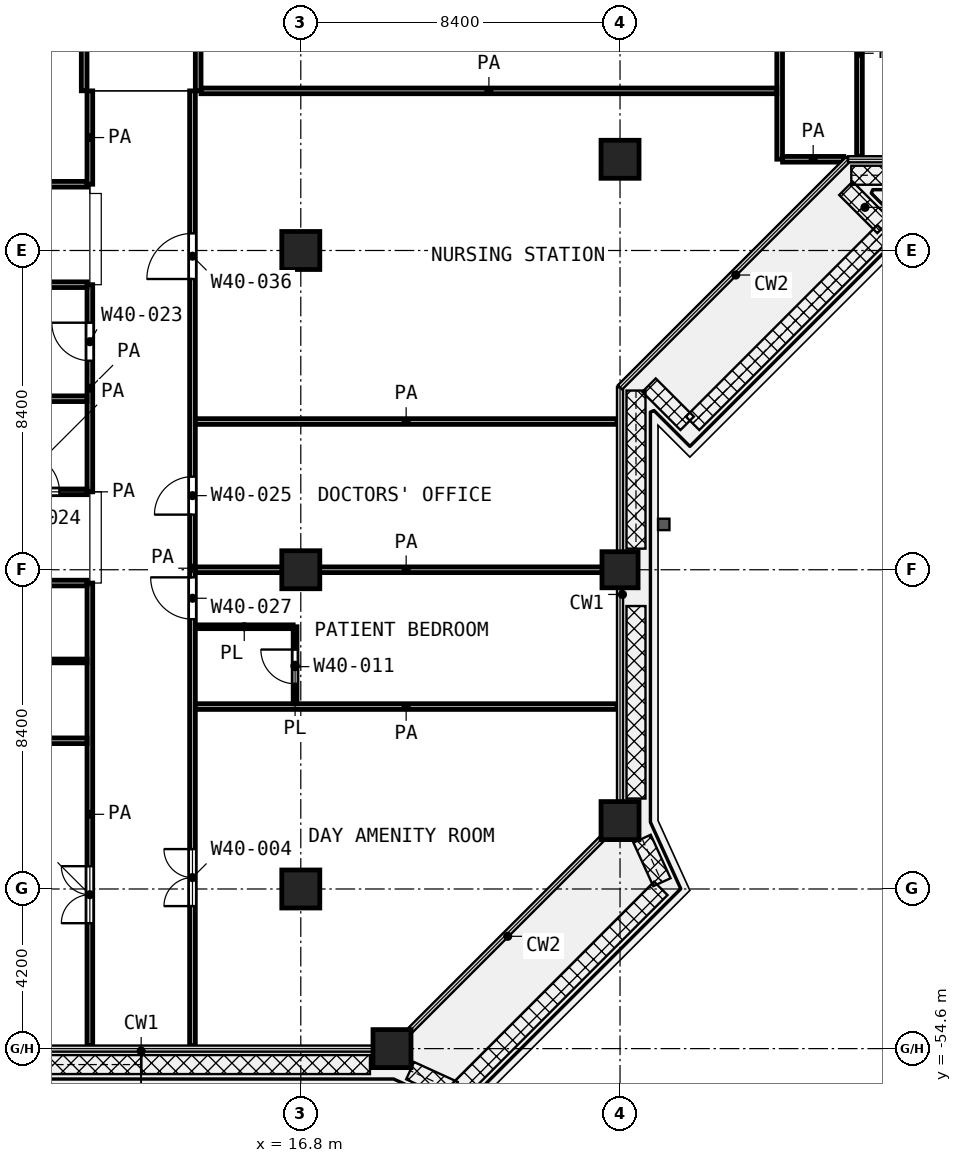
"""IFC4 building model, lengths in metres.
Left out: names, types, materials, properties, quantities, classifications, styles, units other than length and angle.
Written with IfcOpenShell. Run it as: python <this file> out.ifc"""

import sys

from ifc_helpers import new_model, si_unit, direction, frame, frame_2d, origin, origin_2d, place, context, subcontext, project, spatial, rectangle, extrude, element, fill, save


model = new_model("IFC4")
c1 = context("Model", 3, precision=1e-05, world=origin(), true_north=direction((0.0, 1.0)))
c2 = subcontext(c1, "Body", "Model", "MODEL_VIEW")
j1 = project(units=[si_unit("LENGTHUNIT", "METRE"), si_unit("PLANEANGLEUNIT", "RADIAN")], contexts=[c1])
p1 = place(None, origin())
s1 = spatial("IfcSite", under=j1, at=p1, CompositionType="ELEMENT")
p2 = place(p1, origin())
s2 = spatial("IfcBuilding", under=s1, at=p2, CompositionType="ELEMENT")
p3 = place(p2, frame((0.0, 0.0, 196.2)))
s3 = spatial("IfcBuildingStorey", under=s2, at=p3, CompositionType="ELEMENT", Elevation=196.2)
for number, where, z_axis, x_axis in (
    (1, (25.2, -31.2, 0.0), (0.0, 0.0, 1.0), (1.0, 0.0, 0.0)),
    (2, (16.8, -33.6, 0.0), (0.0, 0.0, 1.0), (1.0, 0.0, 0.0)),
    (3, (16.8, -42.0, 0.0), (0.0, 0.0, 1.0), (1.0, 0.0, 0.0)),
):
    element("IfcColumn", number, at=place(p3, frame(where, z_axis=z_axis, x_axis=x_axis)), inside=s3, PredefinedType="COLUMN", context=c2, shape_type="SweptSolid", body=[
        extrude(rectangle(XDim=1.0, YDim=1.0, at=origin_2d()), origin(), (0.0, 0.0, 1.0), 4.2),
    ])
p4 = place(p3, frame((25.2, -42.0, 0.0), z_axis=(0.0, 0.0, 1.0), x_axis=(1.0, 0.0, 0.0)))
e4 = element("IfcColumn", 4, at=p4, inside=s3, PredefinedType="COLUMN", context=c2, shape_type="SweptSolid", body=[
    extrude(rectangle(XDim=0.95, YDim=0.95, at=origin_2d()), origin(), (0.0, 0.0, 1.0), 4.2),
])
for number, where, z_axis, x_axis in (
    (5, (25.2, -48.6, 0.0), (0.0, 0.0, 1.0), (1.0, 0.0, 0.0)),
    (6, (16.8, -50.4, 0.0), (0.0, 0.0, 1.0), (1.0, 0.0, 0.0)),
    (7, (19.2, -54.6, 0.0), (0.0, 0.0, 1.0), (1.0, 0.0, 0.0)),
):
    element("IfcColumn", number, at=place(p3, frame(where, z_axis=z_axis, x_axis=x_axis)), inside=s3, PredefinedType="COLUMN", context=c2, shape_type="SweptSolid", body=[
        extrude(rectangle(XDim=1.0, YDim=1.0, at=origin_2d()), origin(), (0.0, 0.0, 1.0), 4.2),
    ])
p5 = place(p3, frame((8.6, -44.4, 0.0), z_axis=(0.0, 0.0, 1.0), x_axis=(1.0, 0.0, 0.0)))
e8 = element("IfcWall", 8, at=p5, inside=s3, PredefinedType="PARTITIONING", context=c2, shape_type="SweptSolid", body=[
    extrude(rectangle(XDim=2.575, YDim=0.1, at=frame_2d((1.288, 0.0))), origin(), (0.0, 0.0, 1.0), 3.6),
])
p6 = place(p3, frame((14.025, -43.5, 0.0), z_axis=(0.0, 0.0, 1.0), x_axis=(1.0, 0.0, 0.0)))
e9 = element("IfcWall", 9, at=p6, inside=s3, PredefinedType="PARTITIONING", context=c2, shape_type="SweptSolid", body=[
    extrude(rectangle(XDim=2.575, YDim=0.1, at=frame_2d((1.288, 0.0))), origin(), (0.0, 0.0, 1.0), 3.6),
])
p7 = place(p3, frame((16.65, -45.525, 0.0), z_axis=(0.0, 0.0, 1.0), x_axis=(0.0, 1.0, 0.0)))
e10 = element("IfcWall", 10, at=p7, inside=s3, PredefinedType="PARTITIONING", context=c2, shape_type="SweptSolid", body=[
    extrude(rectangle(XDim=2.025, YDim=0.1, at=frame_2d((1.012, 0.0))), origin(), (0.0, 0.0, 1.0), 3.6),
])
p8 = place(p7, frame((0.525, 0.0, 0.0)))
e11 = element("IfcOpeningElement", 11, at=p8, cuts=e10, PredefinedType="OPENING", context=c2, shape_type="SweptSolid", body=[
    extrude(rectangle(XDim=0.9, YDim=2.1, at=frame_2d((0.45, 1.05))), frame((0.0, 0.06, 0.0), z_axis=(0.0, -1.0, 0.0), x_axis=(1.0, 0.0, 0.0)), (0.0, 0.0, 1.0), 0.12),
])
p9 = place(p3, frame((0.08, -46.5, 0.0), z_axis=(0.0, 0.0, 1.0), x_axis=(1.0, 0.0, 0.0)))
e12 = element("IfcWall", 12, at=p9, inside=s3, PredefinedType="PARTITIONING", context=c2, shape_type="SweptSolid", body=[
    extrude(rectangle(XDim=11.095, YDim=0.15, at=frame_2d((5.547, 0.0))), origin(), (0.0, 0.0, 1.0), 3.6),
])
p10 = place(p3, frame((14.025, -45.6, 0.0), z_axis=(0.0, 0.0, 1.0), x_axis=(1.0, 0.0, 0.0)))
e13 = element("IfcWall", 13, at=p10, inside=s3, PredefinedType="PARTITIONING", context=c2, shape_type="SweptSolid", body=[
    extrude(rectangle(XDim=11.095, YDim=0.15, at=frame_2d((5.548, 0.0))), origin(), (0.0, 0.0, 1.0), 3.6),
])
p11 = place(p3, frame((2.327, -42.35, 0.0), z_axis=(0.0, 0.0, 1.0), x_axis=(1.0, 0.0, 0.0)))
e14 = element("IfcWall", 14, at=p11, inside=s3, PredefinedType="PARTITIONING", context=c2, shape_type="SweptSolid", body=[
    extrude(rectangle(XDim=8.848, YDim=0.15, at=frame_2d((4.424, 0.0))), origin(), (0.0, 0.0, 1.0), 3.6),
])
p12 = place(p11, frame((4.324, 0.0, 0.0)))
e15 = element("IfcOpeningElement", 15, at=p12, cuts=e14, PredefinedType="OPENING", context=c2, shape_type="SweptSolid", body=[
    extrude(rectangle(XDim=1.2, YDim=2.1, at=frame_2d((0.6, 1.05))), frame((0.0, 0.085, 0.0), z_axis=(0.0, -1.0, 0.0), x_axis=(1.0, 0.0, 0.0)), (0.0, 0.0, 1.0), 0.17),
])
p13 = place(p11, frame((2.324, 0.0, 0.0)))
e16 = element("IfcOpeningElement", 16, at=p13, cuts=e14, PredefinedType="OPENING", context=c2, shape_type="SweptSolid", body=[
    extrude(rectangle(XDim=1.2, YDim=2.1, at=frame_2d((0.6, 1.05))), frame((0.0, 0.085, 0.0), z_axis=(0.0, -1.0, 0.0), x_axis=(1.0, 0.0, 0.0)), (0.0, 0.0, 1.0), 0.17),
])
p14 = place(p3, frame((14.025, -42.0, 0.0), z_axis=(0.0, 0.0, 1.0), x_axis=(1.0, 0.0, 0.0)))
e17 = element("IfcWall", 17, at=p14, inside=s3, PredefinedType="PARTITIONING", context=c2, shape_type="SweptSolid", body=[
    extrude(rectangle(XDim=11.095, YDim=0.15, at=frame_2d((5.548, 0.0))), origin(), (0.0, 0.0, 1.0), 3.6),
])
p15 = place(p3, frame((8.65, -39.95, 0.0), z_axis=(0.0, 0.0, 1.0), x_axis=(1.0, 0.0, 0.0)))
e18 = element("IfcWall", 18, at=p15, inside=s3, PredefinedType="PARTITIONING", context=c2, shape_type="SweptSolid", body=[
    extrude(rectangle(XDim=2.525, YDim=0.15, at=frame_2d((1.263, 0.0))), origin(), (0.0, 0.0, 1.0), 3.6),
])
p16 = place(p15, frame((0.8, 0.0, 0.0)))
e19 = element("IfcOpeningElement", 19, at=p16, cuts=e18, PredefinedType="OPENING", context=c2, shape_type="SweptSolid", body=[
    extrude(rectangle(XDim=1.0, YDim=2.1, at=frame_2d((0.5, 1.05))), frame((0.0, 0.085, 0.0), z_axis=(0.0, -1.0, 0.0), x_axis=(1.0, 0.0, 0.0)), (0.0, 0.0, 1.0), 0.17),
])
p17 = place(p3, frame((14.025, -38.1, 0.0), z_axis=(0.0, 0.0, 1.0), x_axis=(1.0, 0.0, 0.0)))
e20 = element("IfcWall", 20, at=p17, inside=s3, PredefinedType="PARTITIONING", context=c2, shape_type="SweptSolid", body=[
    extrude(rectangle(XDim=11.095, YDim=0.15, at=frame_2d((5.548, 0.0))), origin(), (0.0, 0.0, 1.0), 3.6),
])
p18 = place(p3, frame((8.65, -37.5, 0.0), z_axis=(0.0, 0.0, 1.0), x_axis=(1.0, 0.0, 0.0)))
e21 = element("IfcWall", 21, at=p18, inside=s3, PredefinedType="PARTITIONING", context=c2, shape_type="SweptSolid", body=[
    extrude(rectangle(XDim=2.525, YDim=0.15, at=frame_2d((1.263, 0.0))), origin(), (0.0, 0.0, 1.0), 3.6),
])
p19 = place(p3, frame((8.975, -34.5, 0.0), z_axis=(0.0, 0.0, 1.0), x_axis=(1.0, 0.0, 0.0)))
e22 = element("IfcWall", 22, at=p19, inside=s3, PredefinedType="PARTITIONING", context=c2, shape_type="SweptSolid", body=[
    extrude(rectangle(XDim=2.2, YDim=0.15, at=frame_2d((1.1, 0.0))), origin(), (0.0, 0.0, 1.0), 3.6),
])
p20 = place(p3, frame((0.08, -31.857, 0.0), z_axis=(0.0, 0.0, 1.0), x_axis=(1.0, 0.0, 0.0)))
e23 = element("IfcWall", 23, at=p20, inside=s3, PredefinedType="PARTITIONING", context=c2, shape_type="SweptSolid", body=[
    extrude(rectangle(XDim=11.095, YDim=0.15, at=frame_2d((5.547, 0.0))), origin(), (0.0, 0.0, 1.0), 3.6),
])
p21 = place(p20, frame((4.945, 0.0, 0.0)))
e24 = element("IfcOpeningElement", 24, at=p21, cuts=e23, PredefinedType="OPENING", context=c2, shape_type="SweptSolid", body=[
    extrude(rectangle(XDim=1.2, YDim=2.1, at=frame_2d((0.6, 1.05))), frame((0.0, 0.085, 0.0), z_axis=(0.0, -1.0, 0.0), x_axis=(1.0, 0.0, 0.0)), (0.0, 0.0, 1.0), 0.17),
])
p22 = place(p3, frame((29.477, -31.2, 0.0), z_axis=(0.0, 0.0, 1.0), x_axis=(1.0, 0.0, 0.0)))
e25 = element("IfcWall", 25, at=p22, inside=s3, PredefinedType="PARTITIONING", context=c2, shape_type="SweptSolid", body=[
    extrude(rectangle(XDim=1.61, YDim=0.15, at=frame_2d((0.805, 0.0))), origin(), (0.0, 0.0, 1.0), 3.6),
])
p23 = place(p3, frame((14.175, -29.4, 0.0), z_axis=(0.0, 0.0, 1.0), x_axis=(1.0, 0.0, 0.0)))
e26 = element("IfcWall", 26, at=p23, inside=s3, PredefinedType="PARTITIONING", context=c2, shape_type="SweptSolid", body=[
    extrude(rectangle(XDim=15.15, YDim=0.15, at=frame_2d((7.575, 0.0))), origin(), (0.0, 0.0, 1.0), 3.6),
])
p24 = place(p3, frame((11.1, -29.398, 0.0), z_axis=(0.0, 0.0, 1.0), x_axis=(0.0, 1.0, 0.0)))
e27 = element("IfcWall", 27, at=p24, inside=s3, PredefinedType="PARTITIONING", context=c2, shape_type="SweptSolid", body=[
    extrude(rectangle(XDim=4.498, YDim=0.15, at=frame_2d((2.249, 0.0))), origin(), (0.0, 0.0, 1.0), 3.6),
])
p25 = place(p3, frame((11.25, -54.52, 0.0), z_axis=(0.0, 0.0, 1.0), x_axis=(0.0, 1.0, 0.0)))
e28 = element("IfcWall", 28, at=p25, inside=s3, PredefinedType="PARTITIONING", context=c2, shape_type="SweptSolid", body=[
    extrude(rectangle(XDim=12.17, YDim=0.15, at=frame_2d((6.085, 0.0))), origin(), (0.0, 0.0, 1.0), 3.6),
])
p26 = place(p25, frame((3.22, 0.0, 0.0)))
e29 = element("IfcOpeningElement", 29, at=p26, cuts=e28, PredefinedType="OPENING", context=c2, shape_type="SweptSolid", body=[
    extrude(rectangle(XDim=1.5, YDim=2.1, at=frame_2d((0.75, 1.05))), frame((0.0, 0.085, 0.0), z_axis=(0.0, -1.0, 0.0), x_axis=(1.0, 0.0, 0.0)), (0.0, 0.0, 1.0), 0.17),
])
p27 = place(p3, frame((11.25, -39.95, 0.0), z_axis=(0.0, 0.0, 1.0), x_axis=(0.0, 1.0, 0.0)))
e30 = element("IfcWall", 30, at=p27, inside=s3, PredefinedType="PARTITIONING", context=c2, shape_type="SweptSolid", body=[
    extrude(rectangle(XDim=5.45, YDim=0.15, at=frame_2d((2.725, 0.0))), origin(), (0.0, 0.0, 1.0), 3.6),
])
p28 = place(p27, frame((3.45, 0.0, 0.0)))
e31 = element("IfcOpeningElement", 31, at=p28, cuts=e30, PredefinedType="OPENING", context=c2, shape_type="SweptSolid", body=[
    extrude(rectangle(XDim=1.0, YDim=2.1, at=frame_2d((0.5, 1.05))), frame((0.0, 0.085, 0.0), z_axis=(0.0, -1.0, 0.0), x_axis=(1.0, 0.0, 0.0)), (0.0, 0.0, 1.0), 0.17),
])
p29 = place(p3, frame((11.25, -31.857, 0.0), z_axis=(0.0, 0.0, 1.0), x_axis=(0.0, 1.0, 0.0)))
e32 = element("IfcWall", 32, at=p29, inside=s3, PredefinedType="PARTITIONING", context=c2, shape_type="SweptSolid", body=[
    extrude(rectangle(XDim=2.457, YDim=0.15, at=frame_2d((1.229, 0.0))), origin(), (0.0, 0.0, 1.0), 3.6),
])
p30 = place(p3, frame((13.95, -54.52, 0.0), z_axis=(0.0, 0.0, 1.0), x_axis=(0.0, 1.0, 0.0)))
e33 = element("IfcWall", 33, at=p30, inside=s3, PredefinedType="PARTITIONING", context=c2, shape_type="SweptSolid", body=[
    extrude(rectangle(XDim=25.12, YDim=0.15, at=frame_2d((12.56, 0.0))), origin(), (0.0, 0.0, 1.0), 3.6),
])
p31 = place(p30, frame((20.17, 0.0, 0.0)))
e34 = element("IfcOpeningElement", 34, at=p31, cuts=e33, PredefinedType="OPENING", context=c2, shape_type="SweptSolid", body=[
    extrude(rectangle(XDim=1.2, YDim=2.1, at=frame_2d((0.6, 1.05))), frame((0.0, 0.085, 0.0), z_axis=(0.0, -1.0, 0.0), x_axis=(1.0, 0.0, 0.0)), (0.0, 0.0, 1.0), 0.17),
])
p32 = place(p30, frame((13.97, 0.0, 0.0)))
e35 = element("IfcOpeningElement", 35, at=p32, cuts=e33, PredefinedType="OPENING", context=c2, shape_type="SweptSolid", body=[
    extrude(rectangle(XDim=1.0, YDim=2.1, at=frame_2d((0.5, 1.05))), frame((0.0, 0.085, 0.0), z_axis=(0.0, -1.0, 0.0), x_axis=(1.0, 0.0, 0.0)), (0.0, 0.0, 1.0), 0.17),
])
p33 = place(p30, frame((11.22, 0.0, 0.0)))
e36 = element("IfcOpeningElement", 36, at=p33, cuts=e33, PredefinedType="OPENING", context=c2, shape_type="SweptSolid", body=[
    extrude(rectangle(XDim=1.1, YDim=2.1, at=frame_2d((0.55, 1.05))), frame((0.0, 0.085, 0.0), z_axis=(0.0, -1.0, 0.0), x_axis=(1.0, 0.0, 0.0)), (0.0, 0.0, 1.0), 0.17),
])
p34 = place(p30, frame((3.67, 0.0, 0.0)))
e37 = element("IfcOpeningElement", 37, at=p34, cuts=e33, PredefinedType="OPENING", context=c2, shape_type="SweptSolid", body=[
    extrude(rectangle(XDim=1.5, YDim=2.1, at=frame_2d((0.75, 1.05))), frame((0.0, 0.085, 0.0), z_axis=(0.0, -1.0, 0.0), x_axis=(1.0, 0.0, 0.0)), (0.0, 0.0, 1.0), 0.17),
])
p35 = place(p3, frame((14.1, -29.4, 0.0), z_axis=(0.0, 0.0, 1.0), x_axis=(0.0, 1.0, 0.0)))
e38 = element("IfcWall", 38, at=p35, inside=s3, PredefinedType="PARTITIONING", context=c2, shape_type="SweptSolid", body=[
    extrude(rectangle(XDim=4.5, YDim=0.15, at=frame_2d((2.25, 0.0))), origin(), (0.0, 0.0, 1.0), 3.6),
])
p36 = place(p3, frame((29.4, -31.198, 0.0), z_axis=(0.0, 0.0, 1.0), x_axis=(0.0, 1.0, 0.0)))
e39 = element("IfcWall", 39, at=p36, inside=s3, PredefinedType="PARTITIONING", context=c2, shape_type="SweptSolid", body=[
    extrude(rectangle(XDim=17.098, YDim=0.15, at=frame_2d((8.549, 0.0))), origin(), (0.0, 0.0, 1.0), 3.6),
])
p37 = place(p3, frame((31.5, -31.12, 0.0), z_axis=(0.0, 0.0, 1.0), x_axis=(0.0, 1.0, 0.0)))
e40 = element("IfcWall", 40, at=p37, inside=s3, PredefinedType="PARTITIONING", context=c2, shape_type="SweptSolid", body=[
    extrude(rectangle(XDim=5.418, YDim=0.15, at=frame_2d((2.709, 0.0))), origin(), (0.0, 0.0, 1.0), 3.6),
])
p38 = place(p28, origin())
e41 = element("IfcDoor", 41, at=p38, inside=s3, OperationType="SINGLE_SWING_RIGHT", PredefinedType="DOOR", context=c2, shape_type="SweptSolid", body=[
    extrude(rectangle(XDim=1.0, YDim=2.1, at=frame_2d((0.5, 1.05))), frame((0.0, 0.025, 0.0), z_axis=(0.0, -1.0, 0.0), x_axis=(1.0, 0.0, 0.0)), (0.0, 0.0, 1.0), 0.05),
])
fill(e31, e41)
p39 = place(p16, origin())
e42 = element("IfcDoor", 42, at=p39, inside=s3, OperationType="SINGLE_SWING_LEFT", PredefinedType="DOOR", context=c2, shape_type="SweptSolid", body=[
    extrude(rectangle(XDim=1.0, YDim=2.1, at=frame_2d((0.5, 1.05))), frame((0.0, 0.025, 0.0), z_axis=(0.0, -1.0, 0.0), x_axis=(1.0, 0.0, 0.0)), (0.0, 0.0, 1.0), 0.05),
])
fill(e19, e42)
p40 = place(p26, origin())
e43 = element("IfcDoor", 43, at=p40, inside=s3, OperationType="DOUBLE_DOOR_SINGLE_SWING", PredefinedType="DOOR", context=c2, shape_type="SweptSolid", body=[
    extrude(rectangle(XDim=1.5, YDim=2.1, at=frame_2d((0.75, 1.05))), frame((0.0, 0.025, 0.0), z_axis=(0.0, -1.0, 0.0), x_axis=(1.0, 0.0, 0.0)), (0.0, 0.0, 1.0), 0.05),
])
fill(e29, e43)
p41 = place(p31, origin())
e44 = element("IfcDoor", 44, at=p41, inside=s3, OperationType="SINGLE_SWING_LEFT", PredefinedType="DOOR", context=c2, shape_type="SweptSolid", body=[
    extrude(rectangle(XDim=1.2, YDim=2.1, at=frame_2d((0.6, 1.05))), frame((0.0, 0.025, 0.0), z_axis=(0.0, -1.0, 0.0), x_axis=(1.0, 0.0, 0.0)), (0.0, 0.0, 1.0), 0.05),
])
fill(e34, e44)
p42 = place(p32, origin())
e45 = element("IfcDoor", 45, at=p42, inside=s3, OperationType="SINGLE_SWING_LEFT", PredefinedType="DOOR", context=c2, shape_type="SweptSolid", body=[
    extrude(rectangle(XDim=1.0, YDim=2.1, at=frame_2d((0.5, 1.05))), frame((0.0, 0.025, 0.0), z_axis=(0.0, -1.0, 0.0), x_axis=(1.0, 0.0, 0.0)), (0.0, 0.0, 1.0), 0.05),
])
fill(e35, e45)
p43 = place(p33, origin())
e46 = element("IfcDoor", 46, at=p43, inside=s3, OperationType="SINGLE_SWING_RIGHT", PredefinedType="DOOR", context=c2, shape_type="SweptSolid", body=[
    extrude(rectangle(XDim=1.1, YDim=2.1, at=frame_2d((0.55, 1.05))), frame((0.0, 0.025, 0.0), z_axis=(0.0, -1.0, 0.0), x_axis=(1.0, 0.0, 0.0)), (0.0, 0.0, 1.0), 0.05),
])
fill(e36, e46)
p44 = place(p8, origin())
e47 = element("IfcDoor", 47, at=p44, inside=s3, OperationType="SINGLE_SWING_RIGHT", PredefinedType="DOOR", context=c2, shape_type="SweptSolid", body=[
    extrude(rectangle(XDim=0.9, YDim=2.1, at=frame_2d((0.45, 1.05))), frame((0.0, 0.025, 0.0), z_axis=(0.0, -1.0, 0.0), x_axis=(1.0, 0.0, 0.0)), (0.0, 0.0, 1.0), 0.05),
])
fill(e11, e47)
p45 = place(p34, origin())
e48 = element("IfcDoor", 48, at=p45, inside=s3, OperationType="DOUBLE_DOOR_SINGLE_SWING", PredefinedType="DOOR", context=c2, shape_type="SweptSolid", body=[
    extrude(rectangle(XDim=1.5, YDim=2.1, at=frame_2d((0.75, 1.05))), frame((0.0, 0.025, 0.0), z_axis=(0.0, -1.0, 0.0), x_axis=(1.0, 0.0, 0.0)), (0.0, 0.0, 1.0), 0.05),
])
fill(e37, e48)
save(model, sys.argv[1])
